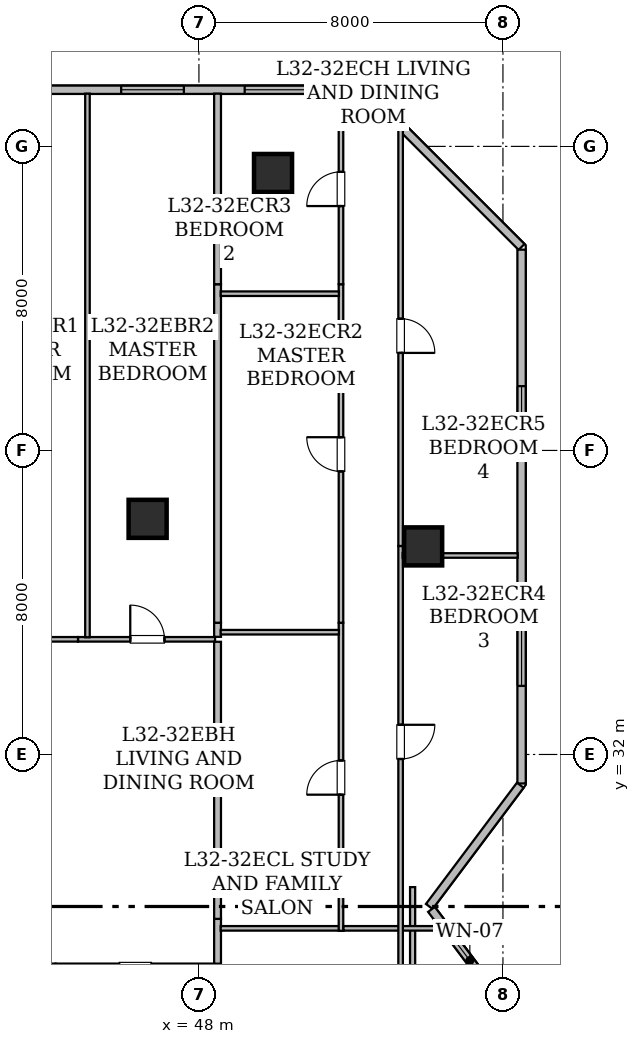
"""IFC4 building model, lengths in metres.
Left out: names, types, materials, properties, quantities, classifications, styles, units other than length and angle.
Written with IfcOpenShell. Run it as: python <this file> out.ifc"""

import sys

from ifc_helpers import new_model, si_unit, direction, frame, frame_2d, origin, origin_2d, place, context, subcontext, project, spatial, rectangle, hollow_rectangle, extrude, element, fill, save


model = new_model("IFC4")
c1 = context("Model", 3, precision=1e-05, world=origin(), true_north=direction((0.0, 1.0)))
c2 = subcontext(c1, "Body", "Model", "MODEL_VIEW")
j1 = project(units=[si_unit("LENGTHUNIT", "METRE"), si_unit("PLANEANGLEUNIT", "RADIAN")], contexts=[c1])
p1 = place(None, origin())
s1 = spatial("IfcSite", under=j1, at=p1, CompositionType="ELEMENT")
p2 = place(p1, origin())
s2 = spatial("IfcBuilding", under=s1, at=p2, CompositionType="ELEMENT")
p3 = place(p2, frame((0.0, 0.0, 127.45)))
s3 = spatial("IfcBuildingStorey", under=s2, at=p3, CompositionType="ELEMENT", Elevation=127.45)
for number, where, z_axis, x_axis in (
    (1, (49.95, 47.3, 0.0), (0.0, 0.0, 1.0), (1.0, 0.0, 0.0)),
    (2, (53.9, 37.475, 0.0), (0.0, 0.0, 1.0), (1.0, 0.0, 0.0)),
    (3, (46.65, 38.2, 0.0), (0.0, 0.0, 1.0), (1.0, 0.0, 0.0)),
):
    element("IfcColumn", number, at=place(p3, frame(where, z_axis=z_axis, x_axis=x_axis)), inside=s3, PredefinedType="COLUMN", context=c2, shape_type="SweptSolid", body=[
        extrude(hollow_rectangle(XDim=1.0, YDim=1.0, WallThickness=0.05, at=origin_2d()), origin(), (0.0, 0.0, 1.0), 3.65),
    ])
p4 = place(p3, frame((13.715, 49.49, 0.0), z_axis=(0.0, 0.0, 1.0), x_axis=(1.0, 0.0, 0.0)))
e4 = element("IfcWall", 4, at=p4, inside=s3, PredefinedType="STANDARD", context=c2, shape_type="SweptSolid", body=[
    extrude(rectangle(XDim=38.639, YDim=0.22, at=frame_2d((19.319, 0.0))), origin(), (0.0, 0.0, 1.0), 3.43),
])
p5 = place(p4, frame((2.243, 0.0, 0.85)))
e5 = element("IfcOpeningElement", 5, at=p5, cuts=e4, PredefinedType="OPENING", context=c2, shape_type="SweptSolid", body=[
    extrude(rectangle(XDim=1.65, YDim=1.55, at=frame_2d((0.825, 0.775))), frame((0.0, 0.12, 0.0), z_axis=(0.0, -1.0, 0.0), x_axis=(1.0, 0.0, 0.0)), (0.0, 0.0, 1.0), 0.24),
])
p6 = place(p4, frame((8.455, 0.0, 0.8)))
e6 = element("IfcOpeningElement", 6, at=p6, cuts=e4, PredefinedType="OPENING", context=c2, shape_type="SweptSolid", body=[
    extrude(rectangle(XDim=1.2, YDim=1.5, at=frame_2d((0.6, 0.75))), frame((0.0, 0.12, 0.0), z_axis=(0.0, -1.0, 0.0), x_axis=(1.0, 0.0, 0.0)), (0.0, 0.0, 1.0), 0.24),
])
p7 = place(p4, frame((5.805, 0.0, 0.85)))
e7 = element("IfcOpeningElement", 7, at=p7, cuts=e4, PredefinedType="OPENING", context=c2, shape_type="SweptSolid", body=[
    extrude(rectangle(XDim=1.65, YDim=1.55, at=frame_2d((0.825, 0.775))), frame((0.0, 0.12, 0.0), z_axis=(0.0, -1.0, 0.0), x_axis=(1.0, 0.0, 0.0)), (0.0, 0.0, 1.0), 0.24),
])
p8 = place(p4, frame((10.655, 0.0, 0.85)))
e8 = element("IfcOpeningElement", 8, at=p8, cuts=e4, PredefinedType="OPENING", context=c2, shape_type="SweptSolid", body=[
    extrude(rectangle(XDim=1.65, YDim=1.55, at=frame_2d((0.825, 0.775))), frame((0.0, 0.12, 0.0), z_axis=(0.0, -1.0, 0.0), x_axis=(1.0, 0.0, 0.0)), (0.0, 0.0, 1.0), 0.24),
])
p9 = place(p4, frame((15.556, 0.0, 0.85)))
e9 = element("IfcOpeningElement", 9, at=p9, cuts=e4, PredefinedType="OPENING", context=c2, shape_type="SweptSolid", body=[
    extrude(rectangle(XDim=1.65, YDim=1.55, at=frame_2d((0.825, 0.775))), frame((0.0, 0.12, 0.0), z_axis=(0.0, -1.0, 0.0), x_axis=(1.0, 0.0, 0.0)), (0.0, 0.0, 1.0), 0.24),
])
p10 = place(p4, frame((22.821, 0.0, 0.85)))
e10 = element("IfcOpeningElement", 10, at=p10, cuts=e4, PredefinedType="OPENING", context=c2, shape_type="SweptSolid", body=[
    extrude(rectangle(XDim=1.65, YDim=1.55, at=frame_2d((0.825, 0.775))), frame((0.0, 0.12, 0.0), z_axis=(0.0, -1.0, 0.0), x_axis=(1.0, 0.0, 0.0)), (0.0, 0.0, 1.0), 0.24),
])
p11 = place(p4, frame((32.239, 0.0, 0.85)))
e11 = element("IfcOpeningElement", 11, at=p11, cuts=e4, PredefinedType="OPENING", context=c2, shape_type="SweptSolid", body=[
    extrude(rectangle(XDim=1.65, YDim=1.55, at=frame_2d((0.825, 0.775))), frame((0.0, 0.12, 0.0), z_axis=(0.0, -1.0, 0.0), x_axis=(1.0, 0.0, 0.0)), (0.0, 0.0, 1.0), 0.24),
])
p12 = place(p4, frame((28.676, 0.0, 0.85)))
e12 = element("IfcOpeningElement", 12, at=p12, cuts=e4, PredefinedType="OPENING", context=c2, shape_type="SweptSolid", body=[
    extrude(rectangle(XDim=1.65, YDim=1.55, at=frame_2d((0.825, 0.775))), frame((0.0, 0.12, 0.0), z_axis=(0.0, -1.0, 0.0), x_axis=(1.0, 0.0, 0.0)), (0.0, 0.0, 1.0), 0.24),
])
p13 = place(p4, frame((35.489, 0.0, 0.85)))
e13 = element("IfcOpeningElement", 13, at=p13, cuts=e4, PredefinedType="OPENING", context=c2, shape_type="SweptSolid", body=[
    extrude(rectangle(XDim=1.65, YDim=1.55, at=frame_2d((0.825, 0.775))), frame((0.0, 0.12, 0.0), z_axis=(0.0, -1.0, 0.0), x_axis=(1.0, 0.0, 0.0)), (0.0, 0.0, 1.0), 0.24),
])
p14 = place(p3, frame((52.402, 49.442, 0.0), z_axis=(0.0, 0.0, 1.0), x_axis=(0.707106781187, -0.707106781187, 0.0)))
e14 = element("IfcWall", 14, at=p14, inside=s3, PredefinedType="STANDARD", context=c2, shape_type="SweptSolid", body=[
    extrude(rectangle(XDim=5.781, YDim=0.22, at=frame_2d((2.891, 0.0))), origin(), (0.0, 0.0, 1.0), 3.43),
])
p15 = place(p3, frame((56.49, 45.283, 0.0), z_axis=(0.0, 0.0, 1.0), x_axis=(0.0, -1.0, 0.0)))
e15 = element("IfcWall", 15, at=p15, inside=s3, PredefinedType="STANDARD", context=c2, shape_type="SweptSolid", body=[
    extrude(rectangle(XDim=14.046, YDim=0.22, at=frame_2d((7.023, 0.0))), origin(), (0.0, 0.0, 1.0), 3.43),
])
p16 = place(p15, frame((9.829, 0.0, 0.85)))
e16 = element("IfcOpeningElement", 16, at=p16, cuts=e15, PredefinedType="OPENING", context=c2, shape_type="SweptSolid", body=[
    extrude(rectangle(XDim=1.65, YDim=1.55, at=frame_2d((0.825, 0.775))), frame((0.0, 0.12, 0.0), z_axis=(0.0, -1.0, 0.0), x_axis=(1.0, 0.0, 0.0)), (0.0, 0.0, 1.0), 0.24),
])
p17 = place(p15, frame((3.591, 0.0, 0.85)))
e17 = element("IfcOpeningElement", 17, at=p17, cuts=e15, PredefinedType="OPENING", context=c2, shape_type="SweptSolid", body=[
    extrude(rectangle(XDim=1.65, YDim=1.55, at=frame_2d((0.825, 0.775))), frame((0.0, 0.12, 0.0), z_axis=(0.0, -1.0, 0.0), x_axis=(1.0, 0.0, 0.0)), (0.0, 0.0, 1.0), 0.24),
])
p18 = place(p3, frame((56.456, 31.191, 0.0), z_axis=(0.0, 0.0, 1.0), x_axis=(-0.600137081448, -0.799897170561, 0.0)))
e18 = element("IfcWall", 18, at=p18, inside=s3, PredefinedType="STANDARD", context=c2, shape_type="SweptSolid", body=[
    extrude(rectangle(XDim=3.989, YDim=0.22, at=frame_2d((1.995, 0.0))), origin(), (0.0, 0.0, 1.0), 3.43),
])
p19 = place(p3, frame((54.119, 27.924, 0.0), z_axis=(0.0, 0.0, 1.0), x_axis=(0.600039540588, -0.799970343032, 0.0)))
e19 = element("IfcWall", 19, at=p19, inside=s3, PredefinedType="STANDARD", context=c2, shape_type="SweptSolid", body=[
    extrude(rectangle(XDim=3.952, YDim=0.22, at=frame_2d((1.976, 0.0))), origin(), (0.0, 0.0, 1.0), 3.43),
])
p20 = place(p19, frame((1.008, 0.0, 0.85)))
e20 = element("IfcOpeningElement", 20, at=p20, cuts=e19, PredefinedType="OPENING", context=c2, shape_type="SweptSolid", body=[
    extrude(rectangle(XDim=1.35, YDim=1.5, at=frame_2d((0.675, 0.75))), frame((0.0, 0.12, 0.0), z_axis=(0.0, -1.0, 0.0), x_axis=(1.0, 0.0, 0.0)), (0.0, 0.0, 1.0), 0.24),
])
p21 = place(p3, frame((44.818, 35.03, 0.0), z_axis=(0.0, 0.0, 1.0), x_axis=(1.0, 0.0, 0.0)))
e21 = element("IfcWall", 21, at=p21, inside=s3, PredefinedType="PARTITIONING", context=c2, shape_type="SweptSolid", body=[
    extrude(rectangle(XDim=3.607, YDim=0.12, at=frame_2d((1.803, 0.0))), origin(), (0.0, 0.0, 1.0), 2.647),
])
p22 = place(p21, frame((1.375, 0.0, 0.0)))
e22 = element("IfcOpeningElement", 22, at=p22, cuts=e21, PredefinedType="OPENING", context=c2, shape_type="SweptSolid", body=[
    extrude(rectangle(XDim=0.9, YDim=2.1, at=frame_2d((0.45, 1.05))), frame((0.0, 0.07, 0.0), z_axis=(0.0, -1.0, 0.0), x_axis=(1.0, 0.0, 0.0)), (0.0, 0.0, 1.0), 0.14),
])
p23 = place(p3, frame((44.229, 26.43, 0.0), z_axis=(0.0, 0.0, 1.0), x_axis=(-1.0, 0.0, 0.0)))
e23 = element("IfcWall", 23, at=p23, inside=s3, PredefinedType="PARTITIONING", context=c2, shape_type="SweptSolid", body=[
    extrude(rectangle(XDim=2.797, YDim=0.135, at=frame_2d((1.398, 0.0))), origin(), (0.0, 0.0, 1.0), 3.43),
])
p24 = place(p23, frame((0.994, 0.0, 0.0)))
e24 = element("IfcOpeningElement", 24, at=p24, cuts=e23, PredefinedType="OPENING", context=c2, shape_type="SweptSolid", body=[
    extrude(rectangle(XDim=0.85, YDim=2.1, at=frame_2d((0.425, 1.05))), frame((0.0, 0.077, 0.0), z_axis=(0.0, -1.0, 0.0), x_axis=(1.0, 0.0, 0.0)), (0.0, 0.0, 1.0), 0.155),
])
p25 = place(p3, frame((48.425, 26.43, 0.0), z_axis=(0.0, 0.0, 1.0), x_axis=(-1.0, 0.0, 0.0)))
e25 = element("IfcWall", 25, at=p25, inside=s3, PredefinedType="PARTITIONING", context=c2, shape_type="SweptSolid", body=[
    extrude(rectangle(XDim=4.196, YDim=0.135, at=frame_2d((2.098, 0.0))), origin(), (0.0, 0.0, 1.0), 2.647),
])
p26 = place(p25, frame((1.673, 0.0, 0.0)))
e26 = element("IfcOpeningElement", 26, at=p26, cuts=e25, PredefinedType="OPENING", context=c2, shape_type="SweptSolid", body=[
    extrude(rectangle(XDim=0.85, YDim=2.1, at=frame_2d((0.425, 1.05))), frame((0.0, 0.077, 0.0), z_axis=(0.0, -1.0, 0.0), x_axis=(1.0, 0.0, 0.0)), (0.0, 0.0, 1.0), 0.155),
])
p27 = place(p3, frame((41.432, 35.03, 0.0), z_axis=(0.0, 0.0, 1.0), x_axis=(1.0, 0.0, 0.0)))
e27 = element("IfcWall", 27, at=p27, inside=s3, PredefinedType="PARTITIONING", context=c2, shape_type="SweptSolid", body=[
    extrude(rectangle(XDim=3.386, YDim=0.12, at=frame_2d((1.693, 0.0))), origin(), (0.0, 0.0, 1.0), 3.43),
])
p28 = place(p27, frame((1.243, 0.0, 0.0)))
e28 = element("IfcOpeningElement", 28, at=p28, cuts=e27, PredefinedType="OPENING", context=c2, shape_type="SweptSolid", body=[
    extrude(rectangle(XDim=0.9, YDim=2.1, at=frame_2d((0.45, 1.05))), frame((0.0, 0.07, 0.0), z_axis=(0.0, -1.0, 0.0), x_axis=(1.0, 0.0, 0.0)), (0.0, 0.0, 1.0), 0.14),
])
p29 = place(p3, frame((48.49, 27.674, 0.0), z_axis=(0.0, 0.0, 1.0), x_axis=(0.0, -1.0, 0.0)))
e29 = element("IfcWall", 29, at=p29, inside=s3, PredefinedType="STANDARD", context=c2, shape_type="SweptSolid", body=[
    extrude(rectangle(XDim=1.179, YDim=0.18, at=frame_2d((0.589, 0.0))), origin(), (0.0, 0.0, 1.0), 3.43),
])
p30 = place(p3, frame((48.49, 34.965, 0.0), z_axis=(0.0, 0.0, 1.0), x_axis=(0.0, -1.0, 0.0)))
e30 = element("IfcWall", 30, at=p30, inside=s3, PredefinedType="STANDARD", context=c2, shape_type="SweptSolid", body=[
    extrude(rectangle(XDim=7.291, YDim=0.18, at=frame_2d((3.646, 0.0))), origin(), (0.0, 0.0, 1.0), 3.43),
])
p31 = place(p3, frame((45.067, 35.084, 0.0), z_axis=(0.0, 0.0, 1.0), x_axis=(0.0, 1.0, 0.0)))
e31 = element("IfcWall", 31, at=p31, inside=s3, PredefinedType="PARTITIONING", context=c2, shape_type="SweptSolid", body=[
    extrude(rectangle(XDim=14.304, YDim=0.12, at=frame_2d((7.152, 0.0))), origin(), (0.0, 0.0, 1.0), 2.647),
])
p32 = place(p3, frame((48.49, 35.466, 0.0), z_axis=(0.0, 0.0, 1.0), x_axis=(0.0, -1.0, 0.0)))
e32 = element("IfcWall", 32, at=p32, inside=s3, PredefinedType="STANDARD", context=c2, shape_type="SweptSolid", body=[
    extrude(rectangle(XDim=0.371, YDim=0.18, at=frame_2d((0.186, 0.0))), origin(), (0.0, 0.0, 1.0), 3.43),
])
p33 = place(p3, frame((48.49, 44.373, 0.0), z_axis=(0.0, 0.0, 1.0), x_axis=(0.0, -1.0, 0.0)))
e33 = element("IfcWall", 33, at=p33, inside=s3, PredefinedType="STANDARD", context=c2, shape_type="SweptSolid", body=[
    extrude(rectangle(XDim=8.907, YDim=0.18, at=frame_2d((4.454, 0.0))), origin(), (0.0, 0.0, 1.0), 2.647),
])
p34 = place(p3, frame((48.49, 49.388, 0.0), z_axis=(0.0, 0.0, 1.0), x_axis=(0.0, -1.0, 0.0)))
e34 = element("IfcWall", 34, at=p34, inside=s3, PredefinedType="STANDARD", context=c2, shape_type="SweptSolid", body=[
    extrude(rectangle(XDim=5.015, YDim=0.18, at=frame_2d((2.507, 0.0))), origin(), (0.0, 0.0, 1.0), 2.647),
])
p35 = place(p3, frame((53.623, 28.51, 0.0), z_axis=(0.0, 0.0, 1.0), x_axis=(0.0, -1.0, 0.0)))
e35 = element("IfcWall", 35, at=p35, inside=s3, PredefinedType="PARTITIONING", context=c2, shape_type="SweptSolid", body=[
    extrude(rectangle(XDim=6.178, YDim=0.135, at=frame_2d((3.089, 0.0))), origin(), (0.0, 0.0, 1.0), 2.876),
])
p36 = place(p3, frame((48.572, 27.425, 0.0), z_axis=(0.0, 0.0, 1.0), x_axis=(1.0, 0.0, 0.0)))
e36 = element("IfcWall", 36, at=p36, inside=s3, PredefinedType="PARTITIONING", context=c2, shape_type="SweptSolid", body=[
    extrude(rectangle(XDim=3.231, YDim=0.12, at=frame_2d((1.615, 0.0))), origin(), (0.0, 0.0, 1.0), 3.43),
])
p37 = place(p3, frame((51.738, 27.36, 0.0), z_axis=(0.0, 0.0, 1.0), x_axis=(0.0, 1.0, 0.0)))
e37 = element("IfcWall", 37, at=p37, inside=s3, PredefinedType="PARTITIONING", context=c2, shape_type="SweptSolid", body=[
    extrude(rectangle(XDim=8.106, YDim=0.12, at=frame_2d((4.053, 0.0))), origin(), (0.0, 0.0, 1.0), 3.43),
])
p38 = place(p37, frame((3.582, 0.0, 0.0)))
e38 = element("IfcOpeningElement", 38, at=p38, cuts=e37, PredefinedType="OPENING", context=c2, shape_type="SweptSolid", body=[
    extrude(rectangle(XDim=0.9, YDim=2.1, at=frame_2d((0.45, 1.05))), frame((0.0, 0.07, 0.0), z_axis=(0.0, -1.0, 0.0), x_axis=(1.0, 0.0, 0.0)), (0.0, 0.0, 1.0), 0.14),
])
p39 = place(p3, frame((51.738, 35.466, 0.0), z_axis=(0.0, 0.0, 1.0), x_axis=(0.0, 1.0, 0.0)))
e39 = element("IfcWall", 39, at=p39, inside=s3, PredefinedType="PARTITIONING", context=c2, shape_type="SweptSolid", body=[
    extrude(rectangle(XDim=8.907, YDim=0.12, at=frame_2d((4.454, 0.0))), origin(), (0.0, 0.0, 1.0), 2.647),
])
p40 = place(p39, frame((3.982, 0.0, 0.0)))
e40 = element("IfcOpeningElement", 40, at=p40, cuts=e39, PredefinedType="OPENING", context=c2, shape_type="SweptSolid", body=[
    extrude(rectangle(XDim=0.9, YDim=2.1, at=frame_2d((0.45, 1.05))), frame((0.0, 0.07, 0.0), z_axis=(0.0, -1.0, 0.0), x_axis=(1.0, 0.0, 0.0)), (0.0, 0.0, 1.0), 0.14),
])
p41 = place(p3, frame((51.738, 44.373, 0.0), z_axis=(0.0, 0.0, 1.0), x_axis=(0.0, 1.0, 0.0)))
e41 = element("IfcWall", 41, at=p41, inside=s3, PredefinedType="PARTITIONING", context=c2, shape_type="SweptSolid", body=[
    extrude(rectangle(XDim=5.015, YDim=0.12, at=frame_2d((2.507, 0.0))), origin(), (0.0, 0.0, 1.0), 3.43),
])
p42 = place(p41, frame((2.057, 0.0, 0.0)))
e42 = element("IfcOpeningElement", 42, at=p42, cuts=e41, PredefinedType="OPENING", context=c2, shape_type="SweptSolid", body=[
    extrude(rectangle(XDim=0.9, YDim=2.1, at=frame_2d((0.45, 1.05))), frame((0.0, 0.07, 0.0), z_axis=(0.0, -1.0, 0.0), x_axis=(1.0, 0.0, 0.0)), (0.0, 0.0, 1.0), 0.14),
])
p43 = place(p3, frame((51.803, 27.425, 0.0), z_axis=(0.0, 0.0, 1.0), x_axis=(1.0, 0.0, 0.0)))
e43 = element("IfcWall", 43, at=p43, inside=s3, PredefinedType="PARTITIONING", context=c2, shape_type="SweptSolid", body=[
    extrude(rectangle(XDim=2.678, YDim=0.12, at=frame_2d((1.339, 0.0))), origin(), (0.0, 0.0, 1.0), 2.876),
])
p44 = place(p3, frame((53.307, 37.486, 0.0), z_axis=(0.0, 0.0, 1.0), x_axis=(0.0, -1.0, 0.0)))
e44 = element("IfcWall", 44, at=p44, inside=s3, PredefinedType="PARTITIONING", context=c2, shape_type="SweptSolid", body=[
    extrude(rectangle(XDim=12.726, YDim=0.12, at=frame_2d((6.363, 0.0))), origin(), (0.0, 0.0, 1.0), 2.647),
])
p45 = place(p44, frame((4.705, 0.0, 0.0)))
e45 = element("IfcOpeningElement", 45, at=p45, cuts=e44, PredefinedType="OPENING", context=c2, shape_type="SweptSolid", body=[
    extrude(rectangle(XDim=0.9, YDim=2.1, at=frame_2d((0.45, 1.05))), frame((0.0, 0.07, 0.0), z_axis=(0.0, -1.0, 0.0), x_axis=(1.0, 0.0, 0.0)), (0.0, 0.0, 1.0), 0.14),
])
p46 = place(p3, frame((53.307, 48.546, 0.0), z_axis=(0.0, 0.0, 1.0), x_axis=(0.0, -1.0, 0.0)))
e46 = element("IfcWall", 46, at=p46, inside=s3, PredefinedType="PARTITIONING", context=c2, shape_type="SweptSolid", body=[
    extrude(rectangle(XDim=11.06, YDim=0.12, at=frame_2d((5.53, 0.0))), origin(), (0.0, 0.0, 1.0), 2.647),
])
p47 = place(p46, frame((5.08, 0.0, 0.0)))
e47 = element("IfcOpeningElement", 47, at=p47, cuts=e46, PredefinedType="OPENING", context=c2, shape_type="SweptSolid", body=[
    extrude(rectangle(XDim=0.9, YDim=2.1, at=frame_2d((0.45, 1.05))), frame((0.0, 0.07, 0.0), z_axis=(0.0, -1.0, 0.0), x_axis=(1.0, 0.0, 0.0)), (0.0, 0.0, 1.0), 0.14),
])
p48 = place(p3, frame((48.572, 35.217, 0.0), z_axis=(0.0, 0.0, 1.0), x_axis=(1.0, 0.0, 0.0)))
e48 = element("IfcWall", 48, at=p48, inside=s3, PredefinedType="PARTITIONING", context=c2, shape_type="SweptSolid", body=[
    extrude(rectangle(XDim=3.112, YDim=0.12, at=frame_2d((1.556, 0.0))), origin(), (0.0, 0.0, 1.0), 3.43),
])
p49 = place(p3, frame((48.572, 44.124, 0.0), z_axis=(0.0, 0.0, 1.0), x_axis=(1.0, 0.0, 0.0)))
e49 = element("IfcWall", 49, at=p49, inside=s3, PredefinedType="PARTITIONING", context=c2, shape_type="SweptSolid", body=[
    extrude(rectangle(XDim=3.112, YDim=0.12, at=frame_2d((1.556, 0.0))), origin(), (0.0, 0.0, 1.0), 2.647),
])
p50 = place(p3, frame((53.361, 37.236, 0.0), z_axis=(0.0, 0.0, 1.0), x_axis=(1.0, 0.0, 0.0)))
e50 = element("IfcWall", 50, at=p50, inside=s3, PredefinedType="PARTITIONING", context=c2, shape_type="SweptSolid", body=[
    extrude(rectangle(XDim=3.027, YDim=0.12, at=frame_2d((1.513, 0.0))), origin(), (0.0, 0.0, 1.0), 2.647),
])
p51 = place(p11, origin())
e51 = element("IfcWindow", 51, at=p51, inside=s3, PartitioningType="SINGLE_PANEL", PredefinedType="WINDOW", context=c2, shape_type="SweptSolid", body=[
    extrude(rectangle(XDim=1.65, YDim=1.55, at=frame_2d((0.825, 0.775))), frame((0.0, 0.03, 0.0), z_axis=(0.0, -1.0, 0.0), x_axis=(1.0, 0.0, 0.0)), (0.0, 0.0, 1.0), 0.06),
])
fill(e11, e51)
p52 = place(p20, origin())
e52 = element("IfcWindow", 52, at=p52, inside=s3, PartitioningType="SINGLE_PANEL", PredefinedType="WINDOW", context=c2, shape_type="SweptSolid", body=[
    extrude(rectangle(XDim=1.35, YDim=1.5, at=frame_2d((0.675, 0.75))), frame((0.0, 0.03, 0.0), z_axis=(0.0, -1.0, 0.0), x_axis=(1.0, 0.0, 0.0)), (0.0, 0.0, 1.0), 0.06),
])
fill(e20, e52)
p53 = place(p13, origin())
e53 = element("IfcWindow", 53, at=p53, inside=s3, PartitioningType="SINGLE_PANEL", PredefinedType="WINDOW", context=c2, shape_type="SweptSolid", body=[
    extrude(rectangle(XDim=1.65, YDim=1.55, at=frame_2d((0.825, 0.775))), frame((0.0, 0.03, 0.0), z_axis=(0.0, -1.0, 0.0), x_axis=(1.0, 0.0, 0.0)), (0.0, 0.0, 1.0), 0.06),
])
fill(e13, e53)
p54 = place(p16, origin())
e54 = element("IfcWindow", 54, at=p54, inside=s3, PartitioningType="SINGLE_PANEL", PredefinedType="WINDOW", context=c2, shape_type="SweptSolid", body=[
    extrude(rectangle(XDim=1.65, YDim=1.55, at=frame_2d((0.825, 0.775))), frame((0.0, 0.03, 0.0), z_axis=(0.0, -1.0, 0.0), x_axis=(1.0, 0.0, 0.0)), (0.0, 0.0, 1.0), 0.06),
])
fill(e16, e54)
p55 = place(p17, origin())
e55 = element("IfcWindow", 55, at=p55, inside=s3, PartitioningType="SINGLE_PANEL", PredefinedType="WINDOW", context=c2, shape_type="SweptSolid", body=[
    extrude(rectangle(XDim=1.65, YDim=1.55, at=frame_2d((0.825, 0.775))), frame((0.0, 0.03, 0.0), z_axis=(0.0, -1.0, 0.0), x_axis=(1.0, 0.0, 0.0)), (0.0, 0.0, 1.0), 0.06),
])
fill(e17, e55)
p56 = place(p22, origin())
e56 = element("IfcDoor", 56, at=p56, inside=s3, OperationType="SINGLE_SWING_LEFT", PredefinedType="DOOR", context=c2, shape_type="SweptSolid", body=[
    extrude(rectangle(XDim=0.9, YDim=2.1, at=frame_2d((0.45, 1.05))), frame((0.0, 0.025, 0.0), z_axis=(0.0, -1.0, 0.0), x_axis=(1.0, 0.0, 0.0)), (0.0, 0.0, 1.0), 0.05),
])
fill(e22, e56)
p57 = place(p38, origin())
e57 = element("IfcDoor", 57, at=p57, inside=s3, OperationType="SINGLE_SWING_LEFT", PredefinedType="DOOR", context=c2, shape_type="SweptSolid", body=[
    extrude(rectangle(XDim=0.9, YDim=2.1, at=frame_2d((0.45, 1.05))), frame((0.0, 0.025, 0.0), z_axis=(0.0, -1.0, 0.0), x_axis=(1.0, 0.0, 0.0)), (0.0, 0.0, 1.0), 0.05),
])
fill(e38, e57)
p58 = place(p40, origin())
e58 = element("IfcDoor", 58, at=p58, inside=s3, OperationType="SINGLE_SWING_RIGHT", PredefinedType="DOOR", context=c2, shape_type="SweptSolid", body=[
    extrude(rectangle(XDim=0.9, YDim=2.1, at=frame_2d((0.45, 1.05))), frame((0.0, 0.025, 0.0), z_axis=(0.0, -1.0, 0.0), x_axis=(1.0, 0.0, 0.0)), (0.0, 0.0, 1.0), 0.05),
])
fill(e40, e58)
p59 = place(p42, origin())
e59 = element("IfcDoor", 59, at=p59, inside=s3, OperationType="SINGLE_SWING_LEFT", PredefinedType="DOOR", context=c2, shape_type="SweptSolid", body=[
    extrude(rectangle(XDim=0.9, YDim=2.1, at=frame_2d((0.45, 1.05))), frame((0.0, 0.025, 0.0), z_axis=(0.0, -1.0, 0.0), x_axis=(1.0, 0.0, 0.0)), (0.0, 0.0, 1.0), 0.05),
])
fill(e42, e59)
p60 = place(p45, origin())
e60 = element("IfcDoor", 60, at=p60, inside=s3, OperationType="SINGLE_SWING_LEFT", PredefinedType="DOOR", context=c2, shape_type="SweptSolid", body=[
    extrude(rectangle(XDim=0.9, YDim=2.1, at=frame_2d((0.45, 1.05))), frame((0.0, 0.025, 0.0), z_axis=(0.0, -1.0, 0.0), x_axis=(1.0, 0.0, 0.0)), (0.0, 0.0, 1.0), 0.05),
])
fill(e45, e60)
p61 = place(p47, origin())
e61 = element("IfcDoor", 61, at=p61, inside=s3, OperationType="SINGLE_SWING_RIGHT", PredefinedType="DOOR", context=c2, shape_type="SweptSolid", body=[
    extrude(rectangle(XDim=0.9, YDim=2.1, at=frame_2d((0.45, 1.05))), frame((0.0, 0.025, 0.0), z_axis=(0.0, -1.0, 0.0), x_axis=(1.0, 0.0, 0.0)), (0.0, 0.0, 1.0), 0.05),
])
fill(e47, e61)
save(model, sys.argv[1])
